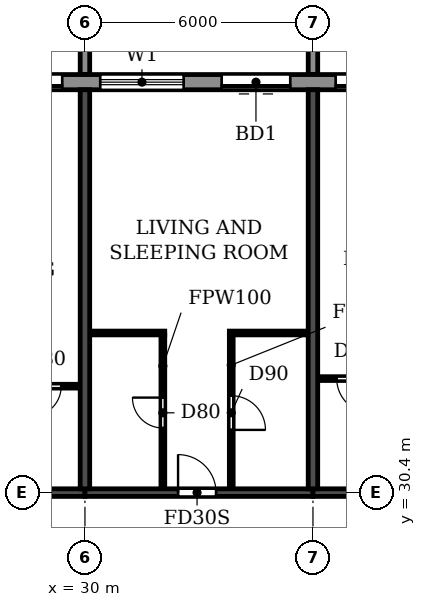
"""IFC4 building model, lengths in metres.
Left out: names, types, materials, properties, quantities, classifications, styles, units other than length and angle.
Written with IfcOpenShell. Run it as: python <this file> out.ifc"""

import sys

from ifc_helpers import new_model, si_unit, direction, frame, frame_2d, origin, place, context, subcontext, project, spatial, polyline, rectangle, outline, extrude, source, transform, mapped, element, fill, save


model = new_model("IFC4")
c1 = context("Model", 3, precision=1e-05, world=origin(), true_north=direction((0.0, 1.0)))
c2 = subcontext(c1, "Body", "Model", "MODEL_VIEW")
j1 = project(units=[si_unit("LENGTHUNIT", "METRE"), si_unit("PLANEANGLEUNIT", "RADIAN")], contexts=[c1])
p1 = place(None, origin())
s1 = spatial("IfcSite", under=j1, at=p1, CompositionType="ELEMENT")
p2 = place(p1, origin())
s2 = spatial("IfcBuilding", under=s1, at=p2, CompositionType="ELEMENT")
p3 = place(p2, frame((0.0, 0.0, 208.2)))
s3 = spatial("IfcBuildingStorey", under=s2, at=p3, CompositionType="ELEMENT", Elevation=208.2)
for number, where, z_axis, x_axis in (
    (1, (30.0, 30.5, 0.0), (0.0, 0.0, 1.0), (0.0, 1.0, 0.0)),
    (2, (36.0, 30.5, 0.0), (0.0, 0.0, 1.0), (0.0, 1.0, 0.0)),
):
    element("IfcWall", number, at=place(p3, frame(where, z_axis=z_axis, x_axis=x_axis)), inside=s3, PredefinedType="SHEAR", context=c2, shape_type="SweptSolid", body=[
        extrude(rectangle(XDim=10.5, YDim=0.25, at=frame_2d((5.25, 0.0))), origin(), (0.0, 0.0, 1.0), 3.0),
    ])
p4 = place(p3, frame((24.0, 30.4, 0.0), z_axis=(0.0, 0.0, 1.0), x_axis=(1.0, 0.0, 0.0)))
e3 = element("IfcWall", 3, at=p4, inside=s3, PredefinedType="SHEAR", context=c2, shape_type="SweptSolid", body=[
    extrude(rectangle(XDim=6.0, YDim=0.2, at=frame_2d((3.0, 0.0))), origin(), (0.0, 0.0, 1.0), 2.4),
])
p5 = place(p4, frame((2.55, 0.0, 0.0)))
e4 = element("IfcOpeningElement", 4, at=p5, cuts=e3, PredefinedType="OPENING", context=c2, shape_type="SweptSolid", body=[
    extrude(rectangle(XDim=1.0, YDim=2.1, at=frame_2d((0.5, 1.05))), frame((0.0, 0.11, 0.0), z_axis=(0.0, -1.0, 0.0), x_axis=(1.0, 0.0, 0.0)), (0.0, 0.0, 1.0), 0.22),
])
p6 = place(p3, frame((30.0, 30.4, 0.0), z_axis=(0.0, 0.0, 1.0), x_axis=(1.0, 0.0, 0.0)))
e5 = element("IfcWall", 5, at=p6, inside=s3, PredefinedType="SHEAR", context=c2, shape_type="SweptSolid", body=[
    extrude(rectangle(XDim=6.0, YDim=0.2, at=frame_2d((3.0, 0.0))), origin(), (0.0, 0.0, 1.0), 2.4),
])
p7 = place(p6, frame((2.45, 0.0, 0.0)))
e6 = element("IfcOpeningElement", 6, at=p7, cuts=e5, PredefinedType="OPENING", context=c2, shape_type="SweptSolid", body=[
    extrude(rectangle(XDim=1.0, YDim=2.1, at=frame_2d((0.5, 1.05))), frame((0.0, 0.11, 0.0), z_axis=(0.0, -1.0, 0.0), x_axis=(1.0, 0.0, 0.0)), (0.0, 0.0, 1.0), 0.22),
])
p8 = place(p3, frame((36.0, 30.4, 0.0), z_axis=(0.0, 0.0, 1.0), x_axis=(1.0, 0.0, 0.0)))
e7 = element("IfcWall", 7, at=p8, inside=s3, PredefinedType="SHEAR", context=c2, shape_type="SweptSolid", body=[
    extrude(rectangle(XDim=6.0, YDim=0.2, at=frame_2d((3.0, 0.0))), origin(), (0.0, 0.0, 1.0), 2.4),
])
p9 = place(p8, frame((2.55, 0.0, 0.0)))
e8 = element("IfcOpeningElement", 8, at=p9, cuts=e7, PredefinedType="OPENING", context=c2, shape_type="SweptSolid", body=[
    extrude(rectangle(XDim=1.0, YDim=2.1, at=frame_2d((0.5, 1.05))), frame((0.0, 0.11, 0.0), z_axis=(0.0, -1.0, 0.0), x_axis=(1.0, 0.0, 0.0)), (0.0, 0.0, 1.0), 0.22),
])
p10 = place(p3, frame((79.317, 41.2, 0.0), z_axis=(0.0, 0.0, 1.0), x_axis=(-1.0, 0.0, 0.0)))
e9 = element("IfcWall", 9, at=p10, inside=s3, PredefinedType="STANDARD", context=c2, shape_type="SweptSolid", body=[
    extrude(rectangle(XDim=56.634, YDim=0.4, at=frame_2d((28.317, 0.0))), origin(), (0.0, 0.0, 1.0), 3.0),
])
p11 = place(p10, frame((52.717, 0.0, 0.9)))
e10 = element("IfcOpeningElement", 10, at=p11, cuts=e9, PredefinedType="OPENING", context=c2, shape_type="SweptSolid", body=[
    extrude(rectangle(XDim=2.2, YDim=1.5, at=frame_2d((1.1, 0.75))), frame((0.0, 0.21, 0.0), z_axis=(0.0, -1.0, 0.0), x_axis=(1.0, 0.0, 0.0)), (0.0, 0.0, 1.0), 0.42),
])
p12 = place(p10, frame((49.917, 0.0, 0.0)))
e11 = element("IfcOpeningElement", 11, at=p12, cuts=e9, PredefinedType="OPENING", context=c2, shape_type="SweptSolid", body=[
    extrude(rectangle(XDim=1.8, YDim=2.4, at=frame_2d((0.9, 1.2))), frame((0.0, 0.21, 0.0), z_axis=(0.0, -1.0, 0.0), x_axis=(1.0, 0.0, 0.0)), (0.0, 0.0, 1.0), 0.42),
])
p13 = place(p10, frame((46.717, 0.0, 0.9)))
e12 = element("IfcOpeningElement", 12, at=p13, cuts=e9, PredefinedType="OPENING", context=c2, shape_type="SweptSolid", body=[
    extrude(rectangle(XDim=2.2, YDim=1.5, at=frame_2d((1.1, 0.75))), frame((0.0, 0.21, 0.0), z_axis=(0.0, -1.0, 0.0), x_axis=(1.0, 0.0, 0.0)), (0.0, 0.0, 1.0), 0.42),
])
p14 = place(p10, frame((43.917, 0.0, 0.0)))
e13 = element("IfcOpeningElement", 13, at=p14, cuts=e9, PredefinedType="OPENING", context=c2, shape_type="SweptSolid", body=[
    extrude(rectangle(XDim=1.8, YDim=2.4, at=frame_2d((0.9, 1.2))), frame((0.0, 0.21, 0.0), z_axis=(0.0, -1.0, 0.0), x_axis=(1.0, 0.0, 0.0)), (0.0, 0.0, 1.0), 0.42),
])
p15 = place(p10, frame((40.917, 0.0, 0.0)))
e14 = element("IfcOpeningElement", 14, at=p15, cuts=e9, PredefinedType="OPENING", context=c2, shape_type="SweptSolid", body=[
    extrude(rectangle(XDim=1.8, YDim=2.4, at=frame_2d((0.9, 1.2))), frame((0.0, 0.21, 0.0), z_axis=(0.0, -1.0, 0.0), x_axis=(1.0, 0.0, 0.0)), (0.0, 0.0, 1.0), 0.42),
])
p16 = place(p10, frame((37.717, 0.0, 0.9)))
e15 = element("IfcOpeningElement", 15, at=p16, cuts=e9, PredefinedType="OPENING", context=c2, shape_type="SweptSolid", body=[
    extrude(rectangle(XDim=2.2, YDim=1.5, at=frame_2d((1.1, 0.75))), frame((0.0, 0.21, 0.0), z_axis=(0.0, -1.0, 0.0), x_axis=(1.0, 0.0, 0.0)), (0.0, 0.0, 1.0), 0.42),
])
p17 = place(p10, frame((34.717, 0.0, 0.9)))
e16 = element("IfcOpeningElement", 16, at=p17, cuts=e9, PredefinedType="OPENING", context=c2, shape_type="SweptSolid", body=[
    extrude(rectangle(XDim=2.2, YDim=1.5, at=frame_2d((1.1, 0.75))), frame((0.0, 0.21, 0.0), z_axis=(0.0, -1.0, 0.0), x_axis=(1.0, 0.0, 0.0)), (0.0, 0.0, 1.0), 0.42),
])
p18 = place(p10, frame((31.717, 0.0, 0.9)))
e17 = element("IfcOpeningElement", 17, at=p18, cuts=e9, PredefinedType="OPENING", context=c2, shape_type="SweptSolid", body=[
    extrude(rectangle(XDim=2.2, YDim=1.5, at=frame_2d((1.1, 0.75))), frame((0.0, 0.21, 0.0), z_axis=(0.0, -1.0, 0.0), x_axis=(1.0, 0.0, 0.0)), (0.0, 0.0, 1.0), 0.42),
])
p19 = place(p10, frame((28.717, 0.0, 0.9)))
e18 = element("IfcOpeningElement", 18, at=p19, cuts=e9, PredefinedType="OPENING", context=c2, shape_type="SweptSolid", body=[
    extrude(rectangle(XDim=2.2, YDim=1.5, at=frame_2d((1.1, 0.75))), frame((0.0, 0.21, 0.0), z_axis=(0.0, -1.0, 0.0), x_axis=(1.0, 0.0, 0.0)), (0.0, 0.0, 1.0), 0.42),
])
p20 = place(p10, frame((25.917, 0.0, 0.0)))
e19 = element("IfcOpeningElement", 19, at=p20, cuts=e9, PredefinedType="OPENING", context=c2, shape_type="SweptSolid", body=[
    extrude(rectangle(XDim=1.8, YDim=2.4, at=frame_2d((0.9, 1.2))), frame((0.0, 0.21, 0.0), z_axis=(0.0, -1.0, 0.0), x_axis=(1.0, 0.0, 0.0)), (0.0, 0.0, 1.0), 0.42),
])
p21 = place(p10, frame((22.717, 0.0, 0.9)))
e20 = element("IfcOpeningElement", 20, at=p21, cuts=e9, PredefinedType="OPENING", context=c2, shape_type="SweptSolid", body=[
    extrude(rectangle(XDim=2.2, YDim=1.5, at=frame_2d((1.1, 0.75))), frame((0.0, 0.21, 0.0), z_axis=(0.0, -1.0, 0.0), x_axis=(1.0, 0.0, 0.0)), (0.0, 0.0, 1.0), 0.42),
])
p22 = place(p10, frame((19.717, 0.0, 0.9)))
e21 = element("IfcOpeningElement", 21, at=p22, cuts=e9, PredefinedType="OPENING", context=c2, shape_type="SweptSolid", body=[
    extrude(rectangle(XDim=2.2, YDim=1.5, at=frame_2d((1.1, 0.75))), frame((0.0, 0.21, 0.0), z_axis=(0.0, -1.0, 0.0), x_axis=(1.0, 0.0, 0.0)), (0.0, 0.0, 1.0), 0.42),
])
p23 = place(p10, frame((16.917, 0.0, 0.0)))
e22 = element("IfcOpeningElement", 22, at=p23, cuts=e9, PredefinedType="OPENING", context=c2, shape_type="SweptSolid", body=[
    extrude(rectangle(XDim=1.8, YDim=2.4, at=frame_2d((0.9, 1.2))), frame((0.0, 0.21, 0.0), z_axis=(0.0, -1.0, 0.0), x_axis=(1.0, 0.0, 0.0)), (0.0, 0.0, 1.0), 0.42),
])
p24 = place(p10, frame((13.717, 0.0, 0.9)))
e23 = element("IfcOpeningElement", 23, at=p24, cuts=e9, PredefinedType="OPENING", context=c2, shape_type="SweptSolid", body=[
    extrude(rectangle(XDim=2.2, YDim=1.5, at=frame_2d((1.1, 0.75))), frame((0.0, 0.21, 0.0), z_axis=(0.0, -1.0, 0.0), x_axis=(1.0, 0.0, 0.0)), (0.0, 0.0, 1.0), 0.42),
])
p25 = place(p10, frame((10.717, 0.0, 0.9)))
e24 = element("IfcOpeningElement", 24, at=p25, cuts=e9, PredefinedType="OPENING", context=c2, shape_type="SweptSolid", body=[
    extrude(rectangle(XDim=2.2, YDim=1.5, at=frame_2d((1.1, 0.75))), frame((0.0, 0.21, 0.0), z_axis=(0.0, -1.0, 0.0), x_axis=(1.0, 0.0, 0.0)), (0.0, 0.0, 1.0), 0.42),
])
p26 = place(p10, frame((7.717, 0.0, 0.9)))
e25 = element("IfcOpeningElement", 25, at=p26, cuts=e9, PredefinedType="OPENING", context=c2, shape_type="SweptSolid", body=[
    extrude(rectangle(XDim=2.2, YDim=1.5, at=frame_2d((1.1, 0.75))), frame((0.0, 0.21, 0.0), z_axis=(0.0, -1.0, 0.0), x_axis=(1.0, 0.0, 0.0)), (0.0, 0.0, 1.0), 0.42),
])
p27 = place(p10, frame((4.917, 0.0, 0.0)))
e26 = element("IfcOpeningElement", 26, at=p27, cuts=e9, PredefinedType="OPENING", context=c2, shape_type="SweptSolid", body=[
    extrude(rectangle(XDim=1.8, YDim=2.4, at=frame_2d((0.9, 1.2))), frame((0.0, 0.21, 0.0), z_axis=(0.0, -1.0, 0.0), x_axis=(1.0, 0.0, 0.0)), (0.0, 0.0, 1.0), 0.42),
])
p28 = place(p10, frame((1.717, 0.0, 0.9)))
e27 = element("IfcOpeningElement", 27, at=p28, cuts=e9, PredefinedType="OPENING", context=c2, shape_type="SweptSolid", body=[
    extrude(rectangle(XDim=2.2, YDim=1.5, at=frame_2d((1.1, 0.75))), frame((0.0, 0.21, 0.0), z_axis=(0.0, -1.0, 0.0), x_axis=(1.0, 0.0, 0.0)), (0.0, 0.0, 1.0), 0.42),
])
m1 = source(origin(), c2, "Body", "SweptSolid", [
    extrude(outline(polyline([(0.0, 0.0), (0.25, 0.0), (0.25, 3.1), (0.0, 3.1), (0.0, 0.0)])), origin(), (0.0, 0.0, 1.0), 3.1),
])
for number, where in (
    (28, (29.875, 41.4, 0.0)),
    (29, (35.875, 41.4, 0.0)),
):
    element("IfcWall", number, at=place(p3, frame(where)), inside=s3, PredefinedType="STANDARD", context=c2, shape_type="MappedRepresentation", body=[
        mapped(m1, transform((0.0, 0.0, 0.0))),
    ])
p29 = place(p3, frame((27.9, 33.2, 0.0), z_axis=(0.0, 0.0, 1.0), x_axis=(1.0, 0.0, 0.0)))
e30 = element("IfcWall", 30, at=p29, inside=s3, PredefinedType="PARTITIONING", context=c2, shape_type="SweptSolid", body=[
    extrude(rectangle(XDim=1.965, YDim=0.1, at=frame_2d((0.982, 0.0))), origin(), (0.0, 0.0, 1.0), 3.0),
])
p30 = place(p29, frame((0.675, 0.0, 0.0)))
e31 = element("IfcOpeningElement", 31, at=p30, cuts=e30, PredefinedType="OPENING", context=c2, shape_type="SweptSolid", body=[
    extrude(rectangle(XDim=0.8, YDim=2.1, at=frame_2d((0.4, 1.05))), frame((0.0, 0.06, 0.0), z_axis=(0.0, -1.0, 0.0), x_axis=(1.0, 0.0, 0.0)), (0.0, 0.0, 1.0), 0.12),
])
p31 = place(p3, frame((36.135, 33.4, 0.0), z_axis=(0.0, 0.0, 1.0), x_axis=(1.0, 0.0, 0.0)))
e32 = element("IfcWall", 32, at=p31, inside=s3, PredefinedType="PARTITIONING", context=c2, shape_type="SweptSolid", body=[
    extrude(rectangle(XDim=2.065, YDim=0.1, at=frame_2d((1.032, 0.0))), origin(), (0.0, 0.0, 1.0), 3.0),
])
p32 = place(p31, frame((0.49, 0.0, 0.0)))
e33 = element("IfcOpeningElement", 33, at=p32, cuts=e32, PredefinedType="OPENING", context=c2, shape_type="SweptSolid", body=[
    extrude(rectangle(XDim=0.9, YDim=2.1, at=frame_2d((0.45, 1.05))), frame((0.0, 0.06, 0.0), z_axis=(0.0, -1.0, 0.0), x_axis=(1.0, 0.0, 0.0)), (0.0, 0.0, 1.0), 0.12),
])
p33 = place(p3, frame((30.135, 34.6, 0.0), z_axis=(0.0, 0.0, 1.0), x_axis=(1.0, 0.0, 0.0)))
e34 = element("IfcWall", 34, at=p33, inside=s3, PredefinedType="PARTITIONING", context=c2, shape_type="SweptSolid", body=[
    extrude(rectangle(XDim=1.965, YDim=0.1, at=frame_2d((0.982, 0.0))), origin(), (0.0, 0.0, 1.0), 3.0),
])
p34 = place(p3, frame((33.8, 34.6, 0.0), z_axis=(0.0, 0.0, 1.0), x_axis=(1.0, 0.0, 0.0)))
e35 = element("IfcWall", 35, at=p34, inside=s3, PredefinedType="PARTITIONING", context=c2, shape_type="SweptSolid", body=[
    extrude(rectangle(XDim=2.065, YDim=0.1, at=frame_2d((1.032, 0.0))), origin(), (0.0, 0.0, 1.0), 3.0),
])
p35 = place(p3, frame((32.05, 30.51, 0.0), z_axis=(0.0, 0.0, 1.0), x_axis=(0.0, 1.0, 0.0)))
e36 = element("IfcWall", 36, at=p35, inside=s3, PredefinedType="PARTITIONING", context=c2, shape_type="SweptSolid", body=[
    extrude(rectangle(XDim=4.04, YDim=0.1, at=frame_2d((2.02, 0.0))), origin(), (0.0, 0.0, 1.0), 3.0),
])
p36 = place(p35, frame((1.59, 0.0, 0.0)))
e37 = element("IfcOpeningElement", 37, at=p36, cuts=e36, PredefinedType="OPENING", context=c2, shape_type="SweptSolid", body=[
    extrude(rectangle(XDim=0.8, YDim=2.1, at=frame_2d((0.4, 1.05))), frame((0.0, 0.06, 0.0), z_axis=(0.0, -1.0, 0.0), x_axis=(1.0, 0.0, 0.0)), (0.0, 0.0, 1.0), 0.12),
])
p37 = place(p3, frame((33.85, 30.51, 0.0), z_axis=(0.0, 0.0, 1.0), x_axis=(0.0, 1.0, 0.0)))
e38 = element("IfcWall", 38, at=p37, inside=s3, PredefinedType="PARTITIONING", context=c2, shape_type="SweptSolid", body=[
    extrude(rectangle(XDim=4.04, YDim=0.1, at=frame_2d((2.02, 0.0))), origin(), (0.0, 0.0, 1.0), 3.0),
])
p38 = place(p37, frame((1.54, 0.0, 0.0)))
e39 = element("IfcOpeningElement", 39, at=p38, cuts=e38, PredefinedType="OPENING", context=c2, shape_type="SweptSolid", body=[
    extrude(rectangle(XDim=0.9, YDim=2.1, at=frame_2d((0.45, 1.05))), frame((0.0, 0.06, 0.0), z_axis=(0.0, -1.0, 0.0), x_axis=(1.0, 0.0, 0.0)), (0.0, 0.0, 1.0), 0.12),
])
p39 = place(p12, origin())
e40 = element("IfcDoor", 40, at=p39, inside=s3, OperationType="DOUBLE_DOOR_SLIDING", PredefinedType="DOOR", context=c2, shape_type="SweptSolid", body=[
    extrude(rectangle(XDim=1.8, YDim=2.4, at=frame_2d((0.9, 1.2))), frame((0.0, 0.025, 0.0), z_axis=(0.0, -1.0, 0.0), x_axis=(1.0, 0.0, 0.0)), (0.0, 0.0, 1.0), 0.05),
])
fill(e11, e40)
p40 = place(p13, origin())
e41 = element("IfcWindow", 41, at=p40, inside=s3, PartitioningType="DOUBLE_PANEL_HORIZONTAL", PredefinedType="WINDOW", context=c2, shape_type="SweptSolid", body=[
    extrude(rectangle(XDim=2.2, YDim=1.5, at=frame_2d((1.1, 0.75))), frame((0.0, 0.03, 0.0), z_axis=(0.0, -1.0, 0.0), x_axis=(1.0, 0.0, 0.0)), (0.0, 0.0, 1.0), 0.06),
])
fill(e12, e41)
p41 = place(p14, origin())
e42 = element("IfcDoor", 42, at=p41, inside=s3, OperationType="DOUBLE_DOOR_SLIDING", PredefinedType="DOOR", context=c2, shape_type="SweptSolid", body=[
    extrude(rectangle(XDim=1.8, YDim=2.4, at=frame_2d((0.9, 1.2))), frame((0.0, 0.025, 0.0), z_axis=(0.0, -1.0, 0.0), x_axis=(1.0, 0.0, 0.0)), (0.0, 0.0, 1.0), 0.05),
])
fill(e13, e42)
p42 = place(p15, origin())
e43 = element("IfcDoor", 43, at=p42, inside=s3, OperationType="DOUBLE_DOOR_SLIDING", PredefinedType="DOOR", context=c2, shape_type="SweptSolid", body=[
    extrude(rectangle(XDim=1.8, YDim=2.4, at=frame_2d((0.9, 1.2))), frame((0.0, 0.025, 0.0), z_axis=(0.0, -1.0, 0.0), x_axis=(1.0, 0.0, 0.0)), (0.0, 0.0, 1.0), 0.05),
])
fill(e14, e43)
p43 = place(p30, frame((0.8, 0.0, 0.0), z_axis=(0.0, 0.0, 1.0), x_axis=(-1.0, 0.0, 0.0)))
e44 = element("IfcDoor", 44, at=p43, inside=s3, OperationType="SINGLE_SWING_RIGHT", PredefinedType="DOOR", context=c2, shape_type="SweptSolid", body=[
    extrude(rectangle(XDim=0.8, YDim=2.1, at=frame_2d((0.4, 1.05))), frame((0.0, 0.025, 0.0), z_axis=(0.0, -1.0, 0.0), x_axis=(1.0, 0.0, 0.0)), (0.0, 0.0, 1.0), 0.05),
])
fill(e31, e44)
p44 = place(p36, origin())
e45 = element("IfcDoor", 45, at=p44, inside=s3, OperationType="SINGLE_SWING_RIGHT", PredefinedType="DOOR", context=c2, shape_type="SweptSolid", body=[
    extrude(rectangle(XDim=0.8, YDim=2.1, at=frame_2d((0.4, 1.05))), frame((0.0, 0.025, 0.0), z_axis=(0.0, -1.0, 0.0), x_axis=(1.0, 0.0, 0.0)), (0.0, 0.0, 1.0), 0.05),
])
fill(e37, e45)
p45 = place(p7, origin())
e46 = element("IfcDoor", 46, at=p45, inside=s3, OperationType="SINGLE_SWING_LEFT", PredefinedType="DOOR", context=c2, shape_type="SweptSolid", body=[
    extrude(rectangle(XDim=1.0, YDim=2.1, at=frame_2d((0.5, 1.05))), frame((0.0, 0.025, 0.0), z_axis=(0.0, -1.0, 0.0), x_axis=(1.0, 0.0, 0.0)), (0.0, 0.0, 1.0), 0.05),
])
fill(e6, e46)
p46 = place(p38, frame((0.9, 0.0, 0.0), z_axis=(0.0, 0.0, 1.0), x_axis=(-1.0, 0.0, 0.0)))
e47 = element("IfcDoor", 47, at=p46, inside=s3, OperationType="SINGLE_SWING_RIGHT", PredefinedType="DOOR", context=c2, shape_type="SweptSolid", body=[
    extrude(rectangle(XDim=0.9, YDim=2.1, at=frame_2d((0.45, 1.05))), frame((0.0, 0.025, 0.0), z_axis=(0.0, -1.0, 0.0), x_axis=(1.0, 0.0, 0.0)), (0.0, 0.0, 1.0), 0.05),
])
fill(e39, e47)
p47 = place(p32, frame((0.9, 0.0, 0.0), z_axis=(0.0, 0.0, 1.0), x_axis=(-1.0, 0.0, 0.0)))
e48 = element("IfcDoor", 48, at=p47, inside=s3, OperationType="SINGLE_SWING_LEFT", PredefinedType="DOOR", context=c2, shape_type="SweptSolid", body=[
    extrude(rectangle(XDim=0.9, YDim=2.1, at=frame_2d((0.45, 1.05))), frame((0.0, 0.025, 0.0), z_axis=(0.0, -1.0, 0.0), x_axis=(1.0, 0.0, 0.0)), (0.0, 0.0, 1.0), 0.05),
])
fill(e33, e48)
save(model, sys.argv[1])
